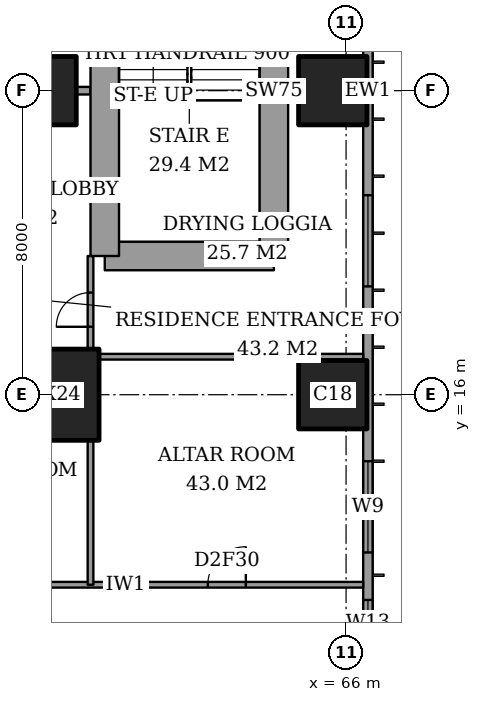
"""IFC4 building model, lengths in metres.
Left out: names, types, materials, properties, quantities, classifications, styles, units other than length and angle.
Written with IfcOpenShell. Run it as: python <this file> out.ifc"""

import sys

from ifc_helpers import new_model, si_unit, direction, frame, frame_2d, origin, origin_2d, place, context, subcontext, project, spatial, rectangle, extrude, element, fill, save


model = new_model("IFC4")
c1 = context("Model", 3, precision=1e-05, world=origin(), true_north=direction((0.0, 1.0)))
c2 = subcontext(c1, "Body", "Model", "MODEL_VIEW")
j1 = project(units=[si_unit("LENGTHUNIT", "METRE"), si_unit("PLANEANGLEUNIT", "RADIAN")], contexts=[c1])
p1 = place(None, origin())
s1 = spatial("IfcSite", under=j1, at=p1, CompositionType="ELEMENT")
p2 = place(p1, origin())
s2 = spatial("IfcBuilding", under=s1, at=p2, CompositionType="ELEMENT")
p3 = place(p2, frame((0.0, 0.0, 214.6)))
s3 = spatial("IfcBuildingStorey", under=s2, at=p3, CompositionType="ELEMENT", Elevation=214.6)
p4 = place(p3, frame((58.0, 16.0, 0.0), z_axis=(0.0, 0.0, 1.0), x_axis=(1.0, 0.0, 0.0)))
e1 = element("IfcColumn", 1, at=p4, inside=s3, PredefinedType="COLUMN", context=c2, shape_type="SweptSolid", body=[
    extrude(rectangle(XDim=3.0, YDim=2.4, at=origin_2d()), origin(), (0.0, 0.0, 1.0), 3.6),
])
for number, where, z_axis, x_axis in (
    (2, (58.0, 24.0, 0.0), (0.0, 0.0, 1.0), (1.0, 0.0, 0.0)),
    (3, (65.65, 16.0, 0.0), (0.0, 0.0, 1.0), (1.0, 0.0, 0.0)),
    (4, (65.65, 24.0, 0.0), (0.0, 0.0, 1.0), (1.0, 0.0, 0.0)),
):
    element("IfcColumn", number, at=place(p3, frame(where, z_axis=z_axis, x_axis=x_axis)), inside=s3, PredefinedType="COLUMN", context=c2, shape_type="SweptSolid", body=[
        extrude(rectangle(XDim=1.8, YDim=1.8, at=origin_2d()), origin(), (0.0, 0.0, 1.0), 3.6),
    ])
p5 = place(p3, frame((59.65, 19.65, 0.0), z_axis=(0.0, 0.0, 1.0), x_axis=(1.0, 0.0, 0.0)))
e5 = element("IfcWall", 5, at=p5, inside=s3, PredefinedType="SHEAR", context=c2, shape_type="SweptSolid", body=[
    extrude(rectangle(XDim=4.45, YDim=0.75, at=frame_2d((2.225, 0.0))), origin(), (0.0, 0.0, 1.0), 3.6),
])
p6 = place(p3, frame((64.1, 19.65, 0.0), z_axis=(0.0, 0.0, 1.0), x_axis=(0.0, 1.0, 0.0)))
e6 = element("IfcWall", 6, at=p6, inside=s3, PredefinedType="SHEAR", context=c2, shape_type="SweptSolid", body=[
    extrude(rectangle(XDim=8.7, YDim=0.75, at=frame_2d((4.35, 0.0))), origin(), (0.0, 0.0, 1.0), 3.6),
])
p7 = place(p3, frame((59.65, 28.35, 0.0), z_axis=(0.0, 0.0, 1.0), x_axis=(0.0, -1.0, 0.0)))
e7 = element("IfcWall", 7, at=p7, inside=s3, PredefinedType="SHEAR", context=c2, shape_type="SweptSolid", body=[
    extrude(rectangle(XDim=8.7, YDim=0.75, at=frame_2d((4.35, 0.0))), origin(), (0.0, 0.0, 1.0), 3.6),
])
p8 = place(p7, frame((0.975, 0.0, 0.0)))
e8 = element("IfcOpeningElement", 8, at=p8, cuts=e7, PredefinedType="OPENING", context=c2, shape_type="SweptSolid", body=[
    extrude(rectangle(XDim=1.0, YDim=2.1, at=frame_2d((0.5, 1.05))), frame((0.0, 0.385, 0.0), z_axis=(0.0, -1.0, 0.0), x_axis=(1.0, 0.0, 0.0)), (0.0, 0.0, 1.0), 0.77),
])
p9 = place(p3, frame((66.575, 3.175, 0.0), z_axis=(0.0, 0.0, 1.0), x_axis=(0.0, 1.0, 0.0)))
e9 = element("IfcWall", 9, at=p9, inside=s3, PredefinedType="SOLIDWALL", context=c2, shape_type="SweptSolid", body=[
    extrude(rectangle(XDim=41.65, YDim=0.25, at=frame_2d((20.825, 0.0))), origin(), (0.0, 0.0, 1.0), 3.6),
])
p10 = place(p9, frame((0.825, 0.0, 0.2)))
e10 = element("IfcOpeningElement", 10, at=p10, cuts=e9, PredefinedType="OPENING", context=c2, shape_type="SweptSolid", body=[
    extrude(rectangle(XDim=2.4, YDim=2.4, at=frame_2d((1.2, 1.2))), frame((0.0, 0.135, 0.0), z_axis=(0.0, -1.0, 0.0), x_axis=(1.0, 0.0, 0.0)), (0.0, 0.0, 1.0), 0.27),
])
p11 = place(p9, frame((6.225, 0.0, 0.2)))
e11 = element("IfcOpeningElement", 11, at=p11, cuts=e9, PredefinedType="OPENING", context=c2, shape_type="SweptSolid", body=[
    extrude(rectangle(XDim=1.2, YDim=2.4, at=frame_2d((0.6, 1.2))), frame((0.0, 0.135, 0.0), z_axis=(0.0, -1.0, 0.0), x_axis=(1.0, 0.0, 0.0)), (0.0, 0.0, 1.0), 0.27),
])
p12 = place(p9, frame((8.675, 0.0, 0.2)))
e12 = element("IfcOpeningElement", 12, at=p12, cuts=e9, PredefinedType="OPENING", context=c2, shape_type="SweptSolid", body=[
    extrude(rectangle(XDim=2.4, YDim=2.4, at=frame_2d((1.2, 1.2))), frame((0.0, 0.135, 0.0), z_axis=(0.0, -1.0, 0.0), x_axis=(1.0, 0.0, 0.0)), (0.0, 0.0, 1.0), 0.27),
])
p13 = place(p9, frame((15.675, 0.0, 0.2)))
e13 = element("IfcOpeningElement", 13, at=p13, cuts=e9, PredefinedType="OPENING", context=c2, shape_type="SweptSolid", body=[
    extrude(rectangle(XDim=2.4, YDim=2.4, at=frame_2d((1.2, 1.2))), frame((0.0, 0.135, 0.0), z_axis=(0.0, -1.0, 0.0), x_axis=(1.0, 0.0, 0.0)), (0.0, 0.0, 1.0), 0.27),
])
p14 = place(p9, frame((23.575, 0.0, 0.2)))
e14 = element("IfcOpeningElement", 14, at=p14, cuts=e9, PredefinedType="OPENING", context=c2, shape_type="SweptSolid", body=[
    extrude(rectangle(XDim=2.4, YDim=2.4, at=frame_2d((1.2, 1.2))), frame((0.0, 0.135, 0.0), z_axis=(0.0, -1.0, 0.0), x_axis=(1.0, 0.0, 0.0)), (0.0, 0.0, 1.0), 0.27),
])
p15 = place(p9, frame((30.775, 0.0, 0.2)))
e15 = element("IfcOpeningElement", 15, at=p15, cuts=e9, PredefinedType="OPENING", context=c2, shape_type="SweptSolid", body=[
    extrude(rectangle(XDim=2.4, YDim=2.4, at=frame_2d((1.2, 1.2))), frame((0.0, 0.135, 0.0), z_axis=(0.0, -1.0, 0.0), x_axis=(1.0, 0.0, 0.0)), (0.0, 0.0, 1.0), 0.27),
])
p16 = place(p9, frame((34.55, 0.0, 0.2)))
e16 = element("IfcOpeningElement", 16, at=p16, cuts=e9, PredefinedType="OPENING", context=c2, shape_type="SweptSolid", body=[
    extrude(rectangle(XDim=1.2, YDim=2.4, at=frame_2d((0.6, 1.2))), frame((0.0, 0.135, 0.0), z_axis=(0.0, -1.0, 0.0), x_axis=(1.0, 0.0, 0.0)), (0.0, 0.0, 1.0), 0.27),
])
p17 = place(p9, frame((38.425, 0.0, 0.2)))
e17 = element("IfcOpeningElement", 17, at=p17, cuts=e9, PredefinedType="OPENING", context=c2, shape_type="SweptSolid", body=[
    extrude(rectangle(XDim=2.4, YDim=2.4, at=frame_2d((1.2, 1.2))), frame((0.0, 0.135, 0.0), z_axis=(0.0, -1.0, 0.0), x_axis=(1.0, 0.0, 0.0)), (0.0, 0.0, 1.0), 0.27),
])
p18 = place(p3, frame((41.439, 11.0, 0.0), z_axis=(0.0, 0.0, 1.0), x_axis=(1.0, 0.0, 0.0)))
e18 = element("IfcWall", 18, at=p18, inside=s3, PredefinedType="PARTITIONING", context=c2, shape_type="SweptSolid", body=[
    extrude(rectangle(XDim=25.011, YDim=0.15, at=frame_2d((12.505, 0.0))), origin(), (0.0, 0.0, 1.0), 3.35),
])
p19 = place(p18, frame((12.361, 0.0, 0.0)))
e19 = element("IfcOpeningElement", 19, at=p19, cuts=e18, PredefinedType="OPENING", context=c2, shape_type="SweptSolid", body=[
    extrude(rectangle(XDim=1.0, YDim=2.1, at=frame_2d((0.5, 1.05))), frame((0.0, 0.085, 0.0), z_axis=(0.0, -1.0, 0.0), x_axis=(1.0, 0.0, 0.0)), (0.0, 0.0, 1.0), 0.17),
])
p20 = place(p18, frame((20.924, 0.0, 0.0)))
e20 = element("IfcOpeningElement", 20, at=p20, cuts=e18, PredefinedType="OPENING", context=c2, shape_type="SweptSolid", body=[
    extrude(rectangle(XDim=1.0, YDim=2.1, at=frame_2d((0.5, 1.05))), frame((0.0, 0.085, 0.0), z_axis=(0.0, -1.0, 0.0), x_axis=(1.0, 0.0, 0.0)), (0.0, 0.0, 1.0), 0.17),
])
p21 = place(p18, frame((15.448, 0.0, 0.0)))
e21 = element("IfcOpeningElement", 21, at=p21, cuts=e18, PredefinedType="OPENING", context=c2, shape_type="SweptSolid", body=[
    extrude(rectangle(XDim=0.9, YDim=2.1, at=frame_2d((0.45, 1.05))), frame((0.0, 0.085, 0.0), z_axis=(0.0, -1.0, 0.0), x_axis=(1.0, 0.0, 0.0)), (0.0, 0.0, 1.0), 0.17),
])
p22 = place(p18, frame((9.961, 0.0, 0.0)))
e22 = element("IfcOpeningElement", 22, at=p22, cuts=e18, PredefinedType="OPENING", context=c2, shape_type="SweptSolid", body=[
    extrude(rectangle(XDim=1.0, YDim=2.1, at=frame_2d((0.5, 1.05))), frame((0.0, 0.085, 0.0), z_axis=(0.0, -1.0, 0.0), x_axis=(1.0, 0.0, 0.0)), (0.0, 0.0, 1.0), 0.17),
])
p23 = place(p18, frame((7.411, 0.0, 0.0)))
e23 = element("IfcOpeningElement", 23, at=p23, cuts=e18, PredefinedType="OPENING", context=c2, shape_type="SweptSolid", body=[
    extrude(rectangle(XDim=0.9, YDim=2.1, at=frame_2d((0.45, 1.05))), frame((0.0, 0.085, 0.0), z_axis=(0.0, -1.0, 0.0), x_axis=(1.0, 0.0, 0.0)), (0.0, 0.0, 1.0), 0.17),
])
p24 = place(p18, frame((2.836, 0.0, 0.0)))
e24 = element("IfcOpeningElement", 24, at=p24, cuts=e18, PredefinedType="OPENING", context=c2, shape_type="SweptSolid", body=[
    extrude(rectangle(XDim=1.0, YDim=2.1, at=frame_2d((0.5, 1.05))), frame((0.0, 0.085, 0.0), z_axis=(0.0, -1.0, 0.0), x_axis=(1.0, 0.0, 0.0)), (0.0, 0.0, 1.0), 0.17),
])
p25 = place(p3, frame((59.5, 17.0, 0.0), z_axis=(0.0, 0.0, 1.0), x_axis=(1.0, 0.0, 0.0)))
e25 = element("IfcWall", 25, at=p25, inside=s3, PredefinedType="PARTITIONING", context=c2, shape_type="SweptSolid", body=[
    extrude(rectangle(XDim=6.95, YDim=0.15, at=frame_2d((3.475, 0.0))), origin(), (0.0, 0.0, 1.0), 3.35),
])
p26 = place(p3, frame((58.9, 24.0, 0.0), z_axis=(0.0, 0.0, 1.0), x_axis=(1.0, 0.0, 0.0)))
e26 = element("IfcWall", 26, at=p26, inside=s3, PredefinedType="PARTITIONING", context=c2, shape_type="SweptSolid", body=[
    extrude(rectangle(XDim=0.375, YDim=0.2, at=frame_2d((0.188, 0.0))), origin(), (0.0, 0.0, 1.0), 3.35),
])
p27 = place(p3, frame((59.275, 11.0, 0.0), z_axis=(0.0, 0.0, 1.0), x_axis=(0.0, 1.0, 0.0)))
e27 = element("IfcWall", 27, at=p27, inside=s3, PredefinedType="PARTITIONING", context=c2, shape_type="SweptSolid", body=[
    extrude(rectangle(XDim=3.8, YDim=0.15, at=frame_2d((1.9, 0.0))), origin(), (0.0, 0.0, 1.0), 3.35),
])
p28 = place(p3, frame((59.275, 17.2, 0.0), z_axis=(0.0, 0.0, 1.0), x_axis=(0.0, 1.0, 0.0)))
e28 = element("IfcWall", 28, at=p28, inside=s3, PredefinedType="PARTITIONING", context=c2, shape_type="SweptSolid", body=[
    extrude(rectangle(XDim=2.45, YDim=0.15, at=frame_2d((1.225, 0.0))), origin(), (0.0, 0.0, 1.0), 3.35),
])
p29 = place(p28, frame((0.587, 0.0, 0.0)))
e29 = element("IfcOpeningElement", 29, at=p29, cuts=e28, PredefinedType="OPENING", context=c2, shape_type="SweptSolid", body=[
    extrude(rectangle(XDim=0.9, YDim=2.1, at=frame_2d((0.45, 1.05))), frame((0.0, 0.085, 0.0), z_axis=(0.0, -1.0, 0.0), x_axis=(1.0, 0.0, 0.0)), (0.0, 0.0, 1.0), 0.17),
])
p30 = place(p11, origin())
e30 = element("IfcWindow", 30, at=p30, inside=s3, PartitioningType="SINGLE_PANEL", PredefinedType="WINDOW", context=c2, shape_type="SweptSolid", body=[
    extrude(rectangle(XDim=1.2, YDim=2.4, at=frame_2d((0.6, 1.2))), frame((0.0, 0.03, 0.0), z_axis=(0.0, -1.0, 0.0), x_axis=(1.0, 0.0, 0.0)), (0.0, 0.0, 1.0), 0.06),
])
fill(e11, e30)
p31 = place(p12, origin())
e31 = element("IfcWindow", 31, at=p31, inside=s3, PartitioningType="SINGLE_PANEL", PredefinedType="WINDOW", context=c2, shape_type="SweptSolid", body=[
    extrude(rectangle(XDim=2.4, YDim=2.4, at=frame_2d((1.2, 1.2))), frame((0.0, 0.03, 0.0), z_axis=(0.0, -1.0, 0.0), x_axis=(1.0, 0.0, 0.0)), (0.0, 0.0, 1.0), 0.06),
])
fill(e12, e31)
p32 = place(p13, origin())
e32 = element("IfcWindow", 32, at=p32, inside=s3, PartitioningType="SINGLE_PANEL", PredefinedType="WINDOW", context=c2, shape_type="SweptSolid", body=[
    extrude(rectangle(XDim=2.4, YDim=2.4, at=frame_2d((1.2, 1.2))), frame((0.0, 0.03, 0.0), z_axis=(0.0, -1.0, 0.0), x_axis=(1.0, 0.0, 0.0)), (0.0, 0.0, 1.0), 0.06),
])
fill(e13, e32)
p33 = place(p20, origin())
e33 = element("IfcDoor", 33, at=p33, inside=s3, OperationType="SINGLE_SWING_LEFT", PredefinedType="DOOR", context=c2, shape_type="SweptSolid", body=[
    extrude(rectangle(XDim=1.0, YDim=2.1, at=frame_2d((0.5, 1.05))), frame((0.0, 0.025, 0.0), z_axis=(0.0, -1.0, 0.0), x_axis=(1.0, 0.0, 0.0)), (0.0, 0.0, 1.0), 0.05),
])
fill(e20, e33)
p34 = place(p29, origin())
e34 = element("IfcDoor", 34, at=p34, inside=s3, OperationType="SINGLE_SWING_RIGHT", PredefinedType="DOOR", context=c2, shape_type="SweptSolid", body=[
    extrude(rectangle(XDim=0.9, YDim=2.1, at=frame_2d((0.45, 1.05))), frame((0.0, 0.025, 0.0), z_axis=(0.0, -1.0, 0.0), x_axis=(1.0, 0.0, 0.0)), (0.0, 0.0, 1.0), 0.05),
])
fill(e29, e34)
save(model, sys.argv[1])
